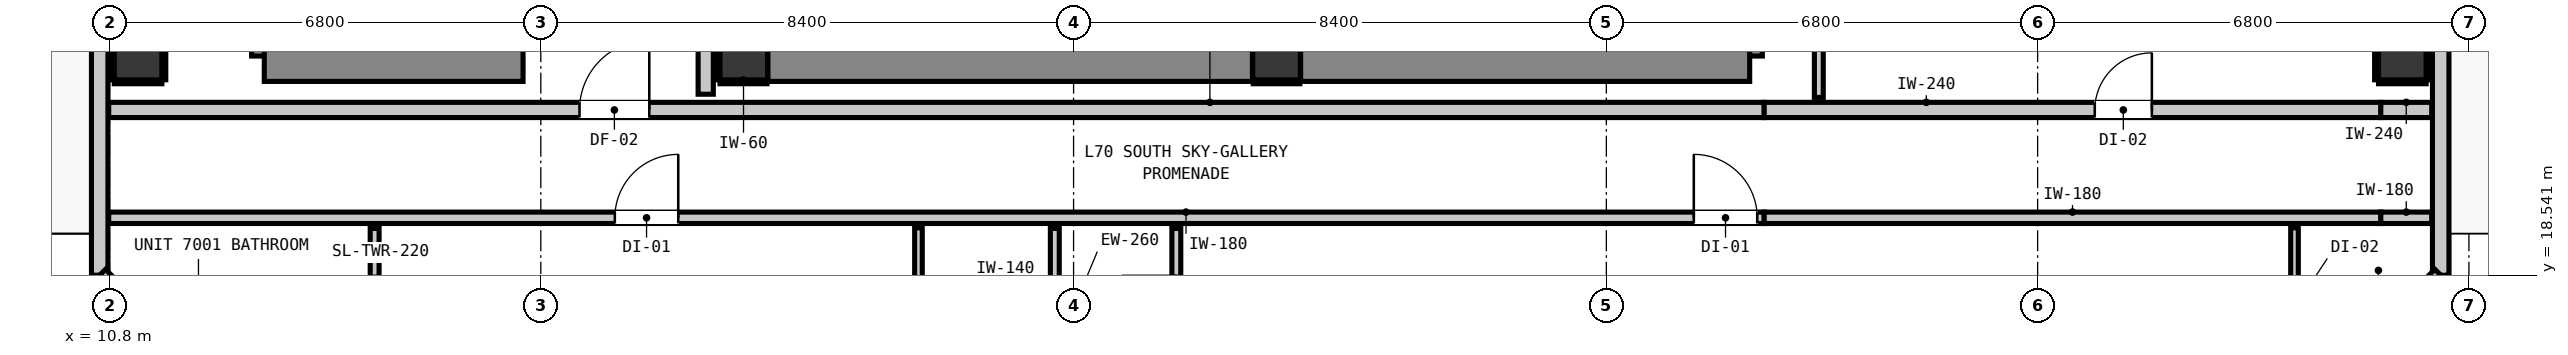
"""IFC4 building model, lengths in metres.
Left out: names, types, materials, properties, quantities, classifications, styles, units other than length and angle.
Written with IfcOpenShell. Run it as: python <this file> out.ifc"""

import sys

from ifc_helpers import new_model, si_unit, direction, frame, frame_2d, origin, origin_2d, place, context, subcontext, project, spatial, rectangle, extrude, element, fill, save


model = new_model("IFC4")
c1 = context("Model", 3, precision=1e-05, world=origin(), true_north=direction((0.0, 1.0)))
c2 = subcontext(c1, "Body", "Model", "MODEL_VIEW")
j1 = project(units=[si_unit("LENGTHUNIT", "METRE"), si_unit("PLANEANGLEUNIT", "RADIAN")], contexts=[c1])
p1 = place(None, origin())
s1 = spatial("IfcSite", under=j1, at=p1, CompositionType="ELEMENT")
p2 = place(p1, origin())
s2 = spatial("IfcBuilding", under=s1, at=p2, CompositionType="ELEMENT")
p3 = place(p2, frame((0.0, 0.0, 241.24)))
s3 = spatial("IfcBuildingStorey", under=s2, at=p3, CompositionType="ELEMENT", Elevation=241.24)
for number, where, z_axis, x_axis in (
    (1, (20.8, 22.0, 0.0), (0.0, 0.0, 1.0), (1.0, 0.0, 0.0)),
    (2, (29.2, 22.0, 0.0), (0.0, 0.0, 1.0), (1.0, 0.0, 0.0)),
):
    element("IfcColumn", number, at=place(p3, frame(where, z_axis=z_axis, x_axis=x_axis)), inside=s3, PredefinedType="COLUMN", context=c2, shape_type="SweptSolid", body=[
        extrude(rectangle(XDim=0.75, YDim=0.75, at=origin_2d()), origin(), (0.0, 0.0, 1.0), 3.32),
    ])
p4 = place(p3, frame((13.44, 22.0, 0.0), z_axis=(0.0, 0.0, 1.0), x_axis=(0.0, 1.0, 0.0)))
e3 = element("IfcWall", 3, at=p4, inside=s3, PredefinedType="SHEAR", context=c2, shape_type="SweptSolid", body=[
    extrude(rectangle(XDim=8.32, YDim=0.8, at=frame_2d((4.16, 0.0))), origin(), (0.0, 0.0, 1.0), 3.32),
])
p5 = place(p3, frame((13.24, 22.0, 0.0), z_axis=(0.0, 0.0, 1.0), x_axis=(1.0, 0.0, 0.0)))
e4 = element("IfcWall", 4, at=p5, inside=s3, PredefinedType="SHEAR", context=c2, shape_type="SweptSolid", body=[
    extrude(rectangle(XDim=4.08, YDim=0.8, at=frame_2d((2.04, 0.0))), origin(), (0.0, 0.0, 1.0), 3.32),
])
p6 = place(p3, frame((36.46, 22.0, 0.0), z_axis=(0.0, 0.0, 1.0), x_axis=(0.0, 1.0, 0.0)))
e5 = element("IfcWall", 5, at=p6, inside=s3, PredefinedType="SHEAR", context=c2, shape_type="SweptSolid", body=[
    extrude(rectangle(XDim=8.32, YDim=0.8, at=frame_2d((4.16, 0.0))), origin(), (0.0, 0.0, 1.0), 3.32),
])
p7 = place(p3, frame((29.58, 22.0, 0.0), z_axis=(0.0, 0.0, 1.0), x_axis=(1.0, 0.0, 0.0)))
e6 = element("IfcWall", 6, at=p7, inside=s3, PredefinedType="SHEAR", context=c2, shape_type="SweptSolid", body=[
    extrude(rectangle(XDim=7.08, YDim=0.8, at=frame_2d((3.54, 0.0))), origin(), (0.0, 0.0, 1.0), 3.32),
])
p8 = place(p3, frame((21.18, 22.0, 0.0), z_axis=(0.0, 0.0, 1.0), x_axis=(1.0, 0.0, 0.0)))
e7 = element("IfcWall", 7, at=p8, inside=s3, PredefinedType="SHEAR", context=c2, shape_type="SweptSolid", body=[
    extrude(rectangle(XDim=7.64, YDim=0.8, at=frame_2d((3.82, 0.0))), origin(), (0.0, 0.0, 1.0), 3.32),
])
for number, where, z_axis, x_axis in (
    (8, (11.25, 22.0, 0.0), (0.0, 0.0, 1.0), (1.0, 0.0, 0.0)),
    (9, (46.95, 22.0, 0.0), (0.0, 0.0, 1.0), (1.0, 0.0, 0.0)),
):
    element("IfcColumn", number, at=place(p3, frame(where, z_axis=z_axis, x_axis=x_axis)), inside=s3, PredefinedType="COLUMN", context=c2, shape_type="SweptSolid", body=[
        extrude(rectangle(XDim=0.75, YDim=0.75, at=origin_2d()), origin(), (0.0, 0.0, 1.0), 3.32),
    ])
p9 = place(p3, frame((10.645, 18.545, 0.0), z_axis=(0.0, 0.0, 1.0), x_axis=(0.0, 1.0, 0.0)))
e10 = element("IfcWall", 10, at=p9, inside=s3, PredefinedType="STANDARD", context=c2, shape_type="SweptSolid", body=[
    extrude(rectangle(XDim=30.31, YDim=0.26, at=frame_2d((15.155, 0.0))), origin(), (0.0, 0.0, 1.0), 3.1),
])
p10 = place(p9, frame((27.695, 0.0, 0.0)))
e11 = element("IfcOpeningElement", 11, at=p10, cuts=e10, PredefinedType="OPENING", context=c2, shape_type="SweptSolid", body=[
    extrude(rectangle(XDim=1.0, YDim=2.15, at=frame_2d((0.5, 1.075))), frame((0.0, 0.14, 0.0), z_axis=(0.0, -1.0, 0.0), x_axis=(1.0, 0.0, 0.0)), (0.0, 0.0, 1.0), 0.28),
])
p11 = place(p9, frame((29.108, 0.0, 0.85)))
e12 = element("IfcOpeningElement", 12, at=p11, cuts=e10, PredefinedType="OPENING", context=c2, shape_type="SweptSolid", body=[
    extrude(rectangle(XDim=0.9, YDim=1.5, at=frame_2d((0.45, 0.75))), frame((0.0, 0.14, 0.0), z_axis=(0.0, -1.0, 0.0), x_axis=(1.0, 0.0, 0.0)), (0.0, 0.0, 1.0), 0.28),
])
p12 = place(p3, frame((47.555, 48.855, 0.0), z_axis=(0.0, 0.0, 1.0), x_axis=(0.0, -1.0, 0.0)))
e13 = element("IfcWall", 13, at=p12, inside=s3, PredefinedType="STANDARD", context=c2, shape_type="SweptSolid", body=[
    extrude(rectangle(XDim=30.31, YDim=0.26, at=frame_2d((15.155, 0.0))), origin(), (0.0, 0.0, 1.0), 3.1),
])
p13 = place(p12, frame((0.91, 0.0, 0.0)))
e14 = element("IfcOpeningElement", 14, at=p13, cuts=e13, PredefinedType="OPENING", context=c2, shape_type="SweptSolid", body=[
    extrude(rectangle(XDim=1.0, YDim=2.15, at=frame_2d((0.5, 1.075))), frame((0.0, 0.14, 0.0), z_axis=(0.0, -1.0, 0.0), x_axis=(1.0, 0.0, 0.0)), (0.0, 0.0, 1.0), 0.28),
])
p14 = place(p12, frame((2.957, 0.0, 0.85)))
e15 = element("IfcOpeningElement", 15, at=p14, cuts=e13, PredefinedType="OPENING", context=c2, shape_type="SweptSolid", body=[
    extrude(rectangle(XDim=3.0, YDim=2.1, at=frame_2d((1.5, 1.05))), frame((0.0, 0.14, 0.0), z_axis=(0.0, -1.0, 0.0), x_axis=(1.0, 0.0, 0.0)), (0.0, 0.0, 1.0), 0.28),
])
p15 = place(p12, frame((21.005, 0.0, 0.85)))
e16 = element("IfcOpeningElement", 16, at=p15, cuts=e13, PredefinedType="OPENING", context=c2, shape_type="SweptSolid", body=[
    extrude(rectangle(XDim=3.0, YDim=2.1, at=frame_2d((1.5, 1.05))), frame((0.0, 0.14, 0.0), z_axis=(0.0, -1.0, 0.0), x_axis=(1.0, 0.0, 0.0)), (0.0, 0.0, 1.0), 0.28),
])
for number, where, z_axis, x_axis in (
    (17, (47.555, 18.545, 0.0), (0.0, 0.0, 1.0), (-0.707, -0.707, 0.0)),
    (18, (12.745, 16.445, 0.0), (0.0, 0.0, 1.0), (-0.707, 0.707, 0.0)),
):
    element("IfcWall", number, at=place(p3, frame(where, z_axis=z_axis, x_axis=x_axis)), inside=s3, PredefinedType="STANDARD", context=c2, shape_type="SweptSolid", body=[
        extrude(rectangle(XDim=2.97, YDim=0.26, at=frame_2d((1.485, 0.0))), origin(), (0.0, 0.0, 1.0), 3.1),
    ])
p16 = place(p3, frame((10.787, 21.15, 0.0), z_axis=(0.0, 0.0, 1.0), x_axis=(1.0, 0.0, 0.0)))
e19 = element("IfcWall", 19, at=p16, inside=s3, PredefinedType="PARTITIONING", context=c2, shape_type="SweptSolid", body=[
    extrude(rectangle(XDim=26.102, YDim=0.24, at=frame_2d((13.051, 0.0))), origin(), (0.0, 0.0, 1.0), 3.1),
])
p17 = place(p16, frame((7.423, 0.0, 0.0)))
e20 = element("IfcOpeningElement", 20, at=p17, cuts=e19, PredefinedType="OPENING", context=c2, shape_type="SweptSolid", body=[
    extrude(rectangle(XDim=1.1, YDim=2.15, at=frame_2d((0.55, 1.075))), frame((0.0, 0.13, 0.0), z_axis=(0.0, -1.0, 0.0), x_axis=(1.0, 0.0, 0.0)), (0.0, 0.0, 1.0), 0.26),
])
p18 = place(p3, frame((36.889, 21.15, 0.0), z_axis=(0.0, 0.0, 1.0), x_axis=(1.0, 0.0, 0.0)))
e21 = element("IfcWall", 21, at=p18, inside=s3, PredefinedType="PARTITIONING", context=c2, shape_type="SweptSolid", body=[
    extrude(rectangle(XDim=9.722, YDim=0.24, at=frame_2d((4.861, 0.0))), origin(), (0.0, 0.0, 1.0), 2.477),
])
p19 = place(p18, frame((5.212, 0.0, 0.0)))
e22 = element("IfcOpeningElement", 22, at=p19, cuts=e21, PredefinedType="OPENING", context=c2, shape_type="SweptSolid", body=[
    extrude(rectangle(XDim=0.9, YDim=2.1, at=frame_2d((0.45, 1.05))), frame((0.0, 0.13, 0.0), z_axis=(0.0, -1.0, 0.0), x_axis=(1.0, 0.0, 0.0)), (0.0, 0.0, 1.0), 0.26),
])
p20 = place(p3, frame((46.611, 21.15, 0.0), z_axis=(0.0, 0.0, 1.0), x_axis=(1.0, 0.0, 0.0)))
e23 = element("IfcWall", 23, at=p20, inside=s3, PredefinedType="PARTITIONING", context=c2, shape_type="SweptSolid", body=[
    extrude(rectangle(XDim=0.802, YDim=0.24, at=frame_2d((0.401, 0.0))), origin(), (0.0, 0.0, 1.0), 3.1),
])
p21 = place(p3, frame((10.787, 19.45, 0.0), z_axis=(0.0, 0.0, 1.0), x_axis=(1.0, 0.0, 0.0)))
e24 = element("IfcWall", 24, at=p21, inside=s3, PredefinedType="PARTITIONING", context=c2, shape_type="SweptSolid", body=[
    extrude(rectangle(XDim=26.102, YDim=0.18, at=frame_2d((13.051, 0.0))), origin(), (0.0, 0.0, 1.0), 3.1),
])
p22 = place(p21, frame((7.98, 0.0, 0.0)))
e25 = element("IfcOpeningElement", 25, at=p22, cuts=e24, PredefinedType="OPENING", context=c2, shape_type="SweptSolid", body=[
    extrude(rectangle(XDim=1.0, YDim=2.15, at=frame_2d((0.5, 1.075))), frame((0.0, 0.1, 0.0), z_axis=(0.0, -1.0, 0.0), x_axis=(1.0, 0.0, 0.0)), (0.0, 0.0, 1.0), 0.2),
])
p23 = place(p21, frame((24.992, 0.0, 0.0)))
e26 = element("IfcOpeningElement", 26, at=p23, cuts=e24, PredefinedType="OPENING", context=c2, shape_type="SweptSolid", body=[
    extrude(rectangle(XDim=1.0, YDim=2.15, at=frame_2d((0.5, 1.075))), frame((0.0, 0.1, 0.0), z_axis=(0.0, -1.0, 0.0), x_axis=(1.0, 0.0, 0.0)), (0.0, 0.0, 1.0), 0.2),
])
p24 = place(p3, frame((36.889, 19.45, 0.0), z_axis=(0.0, 0.0, 1.0), x_axis=(1.0, 0.0, 0.0)))
e27 = element("IfcWall", 27, at=p24, inside=s3, PredefinedType="PARTITIONING", context=c2, shape_type="SweptSolid", body=[
    extrude(rectangle(XDim=9.722, YDim=0.18, at=frame_2d((4.861, 0.0))), origin(), (0.0, 0.0, 1.0), 2.477),
])
p25 = place(p3, frame((46.611, 19.45, 0.0), z_axis=(0.0, 0.0, 1.0), x_axis=(1.0, 0.0, 0.0)))
e28 = element("IfcWall", 28, at=p25, inside=s3, PredefinedType="PARTITIONING", context=c2, shape_type="SweptSolid", body=[
    extrude(rectangle(XDim=0.802, YDim=0.18, at=frame_2d((0.401, 0.0))), origin(), (0.0, 0.0, 1.0), 3.1),
])
p26 = place(p3, frame((20.2, 21.398, 0.0), z_axis=(0.0, 0.0, 1.0), x_axis=(0.0, 1.0, 0.0)))
e29 = element("IfcWall", 29, at=p26, inside=s3, PredefinedType="PARTITIONING", context=c2, shape_type="SweptSolid", body=[
    extrude(rectangle(XDim=6.754, YDim=0.24, at=frame_2d((3.377, 0.0))), origin(), (0.0, 0.0, 1.0), 3.1),
])
p27 = place(p3, frame((14.98, 16.587, 0.0), z_axis=(0.0, 0.0, 1.0), x_axis=(0.0, 1.0, 0.0)))
e30 = element("IfcWall", 30, at=p27, inside=s3, PredefinedType="PARTITIONING", context=c2, shape_type="SweptSolid", body=[
    extrude(rectangle(XDim=2.695, YDim=0.14, at=frame_2d((1.348, 0.0))), origin(), (0.0, 0.0, 1.0), 3.1),
])
p28 = place(p27, frame((1.088, 0.0, 0.0)))
e31 = element("IfcOpeningElement", 31, at=p28, cuts=e30, PredefinedType="OPENING", context=c2, shape_type="SweptSolid", body=[
    extrude(rectangle(XDim=0.86, YDim=2.02, at=frame_2d((0.43, 1.01))), frame((0.0, 0.08, 0.0), z_axis=(0.0, -1.0, 0.0), x_axis=(1.0, 0.0, 0.0)), (0.0, 0.0, 1.0), 0.16),
])
p29 = place(p3, frame((25.704, 16.587, 0.0), z_axis=(0.0, 0.0, 1.0), x_axis=(0.0, 1.0, 0.0)))
e32 = element("IfcWall", 32, at=p29, inside=s3, PredefinedType="PARTITIONING", context=c2, shape_type="SweptSolid", body=[
    extrude(rectangle(XDim=2.695, YDim=0.14, at=frame_2d((1.348, 0.0))), origin(), (0.0, 0.0, 1.0), 3.1),
])
p30 = place(p3, frame((27.62, 16.587, 0.0), z_axis=(0.0, 0.0, 1.0), x_axis=(0.0, 1.0, 0.0)))
e33 = element("IfcWall", 33, at=p30, inside=s3, PredefinedType="PARTITIONING", context=c2, shape_type="SweptSolid", body=[
    extrude(rectangle(XDim=2.695, YDim=0.14, at=frame_2d((1.348, 0.0))), origin(), (0.0, 0.0, 1.0), 3.1),
])
p31 = place(p30, frame((1.088, 0.0, 0.0)))
e34 = element("IfcOpeningElement", 34, at=p31, cuts=e33, PredefinedType="OPENING", context=c2, shape_type="SweptSolid", body=[
    extrude(rectangle(XDim=0.86, YDim=2.02, at=frame_2d((0.43, 1.01))), frame((0.0, 0.08, 0.0), z_axis=(0.0, -1.0, 0.0), x_axis=(1.0, 0.0, 0.0)), (0.0, 0.0, 1.0), 0.16),
])
p32 = place(p3, frame((37.75, 21.348, 0.0), z_axis=(0.0, 0.0, 1.0), x_axis=(0.0, 1.0, 0.0)))
e35 = element("IfcWall", 35, at=p32, inside=s3, PredefinedType="PARTITIONING", context=c2, shape_type="SweptSolid", body=[
    extrude(rectangle(XDim=9.214, YDim=0.14, at=frame_2d((4.607, 0.0))), origin(), (0.0, 0.0, 1.0), 3.1),
])
p33 = place(p3, frame((23.554, 16.587, 0.0), z_axis=(0.0, 0.0, 1.0), x_axis=(0.0, 1.0, 0.0)))
e36 = element("IfcWall", 36, at=p33, inside=s3, PredefinedType="PARTITIONING", context=c2, shape_type="SweptSolid", body=[
    extrude(rectangle(XDim=2.705, YDim=0.12, at=frame_2d((1.353, 0.0))), origin(), (0.0, 0.0, 1.0), 3.1),
])
p34 = place(p33, frame((0.988, 0.0, 0.0)))
e37 = element("IfcOpeningElement", 37, at=p34, cuts=e36, PredefinedType="OPENING", context=c2, shape_type="SweptSolid", body=[
    extrude(rectangle(XDim=0.9, YDim=2.1, at=frame_2d((0.45, 1.05))), frame((0.0, 0.07, 0.0), z_axis=(0.0, -1.0, 0.0), x_axis=(1.0, 0.0, 0.0)), (0.0, 0.0, 1.0), 0.14),
])
p35 = place(p3, frame((45.25, 16.587, 0.0), z_axis=(0.0, 0.0, 1.0), x_axis=(0.0, 1.0, 0.0)))
e38 = element("IfcWall", 38, at=p35, inside=s3, PredefinedType="PARTITIONING", context=c2, shape_type="SweptSolid", body=[
    extrude(rectangle(XDim=2.705, YDim=0.12, at=frame_2d((1.353, 0.0))), origin(), (0.0, 0.0, 1.0), 3.1),
])
p36 = place(p35, frame((0.988, 0.0, 0.0)))
e39 = element("IfcOpeningElement", 39, at=p36, cuts=e38, PredefinedType="OPENING", context=c2, shape_type="SweptSolid", body=[
    extrude(rectangle(XDim=0.9, YDim=2.1, at=frame_2d((0.45, 1.05))), frame((0.0, 0.07, 0.0), z_axis=(0.0, -1.0, 0.0), x_axis=(1.0, 0.0, 0.0)), (0.0, 0.0, 1.0), 0.14),
])
p37 = place(p3, frame((20.425, 21.593, 0.0), z_axis=(0.0, 0.0, 1.0), x_axis=(1.0, 0.0, 0.0)))
e40 = element("IfcWall", 40, at=p37, inside=s3, PredefinedType="PARTITIONING", context=c2, shape_type="SweptSolid", body=[
    extrude(rectangle(XDim=0.742, YDim=0.06, at=frame_2d((0.371, 0.0))), origin(), (0.0, 0.0, 1.0), 1.45),
])
p38 = place(p3, frame((20.393, 21.625, 0.0), z_axis=(0.0, 0.0, 1.0), x_axis=(0.0, 1.0, 0.0)))
e41 = element("IfcWall", 41, at=p38, inside=s3, PredefinedType="PARTITIONING", context=c2, shape_type="SweptSolid", body=[
    extrude(rectangle(XDim=0.75, YDim=0.06, at=frame_2d((0.375, 0.0))), origin(), (0.0, 0.0, 1.0), 1.45),
])
p39 = place(p3, frame((28.833, 21.593, 0.0), z_axis=(0.0, 0.0, 1.0), x_axis=(1.0, 0.0, 0.0)))
e42 = element("IfcWall", 42, at=p39, inside=s3, PredefinedType="PARTITIONING", context=c2, shape_type="SweptSolid", body=[
    extrude(rectangle(XDim=0.734, YDim=0.06, at=frame_2d((0.367, 0.0))), origin(), (0.0, 0.0, 1.0), 1.45),
])
for number, where, z_axis, x_axis in (
    (43, (10.875, 21.593, 0.0), (0.0, 0.0, 1.0), (1.0, 0.0, 0.0)),
    (44, (10.843, 21.625, 0.0), (0.0, 0.0, 1.0), (0.0, 1.0, 0.0)),
    (45, (11.657, 21.625, 0.0), (0.0, 0.0, 1.0), (0.0, 1.0, 0.0)),
    (46, (46.575, 21.593, 0.0), (0.0, 0.0, 1.0), (1.0, 0.0, 0.0)),
    (47, (46.543, 21.625, 0.0), (0.0, 0.0, 1.0), (0.0, 1.0, 0.0)),
    (48, (47.357, 21.625, 0.0), (0.0, 0.0, 1.0), (0.0, 1.0, 0.0)),
):
    element("IfcWall", number, at=place(p3, frame(where, z_axis=z_axis, x_axis=x_axis)), inside=s3, PredefinedType="PARTITIONING", context=c2, shape_type="SweptSolid", body=[
        extrude(rectangle(XDim=0.75, YDim=0.06, at=frame_2d((0.375, 0.0))), origin(), (0.0, 0.0, 1.0), 1.45),
    ])
p40 = place(p17, origin())
e49 = element("IfcDoor", 49, at=p40, inside=s3, OperationType="SINGLE_SWING_RIGHT", PredefinedType="DOOR", context=c2, shape_type="SweptSolid", body=[
    extrude(rectangle(XDim=1.1, YDim=2.15, at=frame_2d((0.55, 1.075))), frame((0.0, 0.025, 0.0), z_axis=(0.0, -1.0, 0.0), x_axis=(1.0, 0.0, 0.0)), (0.0, 0.0, 1.0), 0.05),
])
fill(e20, e49)
p41 = place(p22, origin())
e50 = element("IfcDoor", 50, at=p41, inside=s3, OperationType="SINGLE_SWING_RIGHT", PredefinedType="DOOR", context=c2, shape_type="SweptSolid", body=[
    extrude(rectangle(XDim=1.0, YDim=2.15, at=frame_2d((0.5, 1.075))), frame((0.0, 0.025, 0.0), z_axis=(0.0, -1.0, 0.0), x_axis=(1.0, 0.0, 0.0)), (0.0, 0.0, 1.0), 0.05),
])
fill(e25, e50)
p42 = place(p23, origin())
e51 = element("IfcDoor", 51, at=p42, inside=s3, OperationType="SINGLE_SWING_LEFT", PredefinedType="DOOR", context=c2, shape_type="SweptSolid", body=[
    extrude(rectangle(XDim=1.0, YDim=2.15, at=frame_2d((0.5, 1.075))), frame((0.0, 0.025, 0.0), z_axis=(0.0, -1.0, 0.0), x_axis=(1.0, 0.0, 0.0)), (0.0, 0.0, 1.0), 0.05),
])
fill(e26, e51)
p43 = place(p19, origin())
e52 = element("IfcDoor", 52, at=p43, inside=s3, OperationType="SINGLE_SWING_RIGHT", PredefinedType="DOOR", context=c2, shape_type="SweptSolid", body=[
    extrude(rectangle(XDim=0.9, YDim=2.1, at=frame_2d((0.45, 1.05))), frame((0.0, 0.025, 0.0), z_axis=(0.0, -1.0, 0.0), x_axis=(1.0, 0.0, 0.0)), (0.0, 0.0, 1.0), 0.05),
])
fill(e22, e52)
save(model, sys.argv[1])
